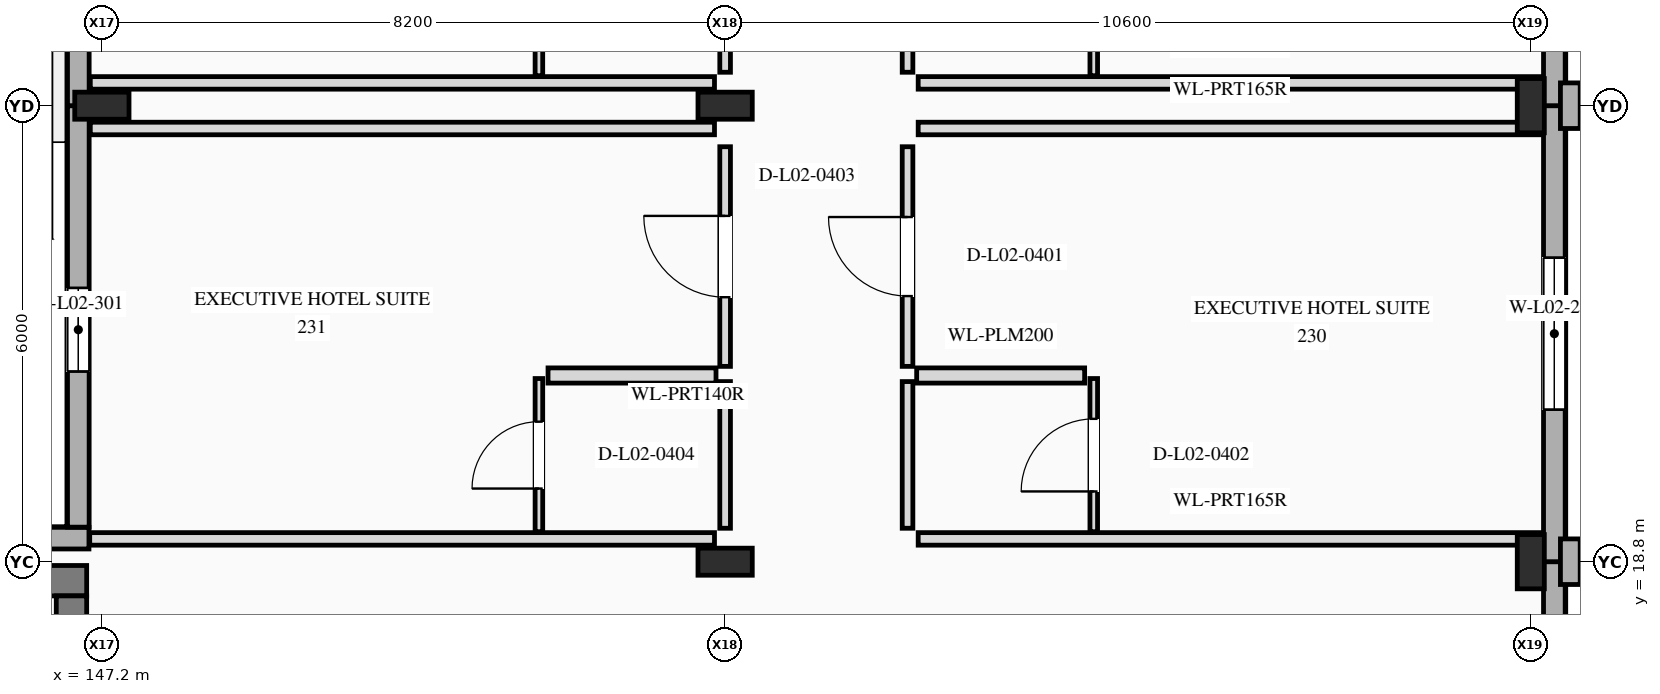
"""IFC4 building model, lengths in metres.
Left out: names, types, materials, properties, quantities, classifications, styles, units other than length and angle.
Written with IfcOpenShell. Run it as: python <this file> out.ifc"""

import sys

from ifc_helpers import new_model, si_unit, direction, frame, frame_2d, origin, origin_2d, place, context, subcontext, project, spatial, rectangle, i_section, extrude, element, fill, save


model = new_model("IFC4")
c1 = context("Model", 3, precision=1e-05, world=origin(), true_north=direction((0.0, 1.0)))
c2 = subcontext(c1, "Body", "Model", "MODEL_VIEW")
j1 = project(units=[si_unit("LENGTHUNIT", "METRE"), si_unit("PLANEANGLEUNIT", "RADIAN")], contexts=[c1])
p1 = place(None, origin())
s1 = spatial("IfcSite", under=j1, at=p1, CompositionType="ELEMENT")
p2 = place(p1, origin())
s2 = spatial("IfcBuilding", under=s1, at=p2, CompositionType="ELEMENT")
p3 = place(p2, frame((0.0, 0.0, 10.8)))
s3 = spatial("IfcBuildingStorey", under=s2, at=p3, CompositionType="ELEMENT", Elevation=10.8)
for number, where, z_axis, x_axis in (
    (1, (147.2, 24.8, 0.0), (0.0, 0.0, 1.0), (0.0, 1.0, 0.0)),
    (2, (155.4, 18.8, 0.0), (0.0, 0.0, 1.0), (0.0, 1.0, 0.0)),
    (3, (155.4, 24.8, 0.0), (0.0, 0.0, 1.0), (0.0, 1.0, 0.0)),
    (4, (166.0, 18.8, 0.0), (0.0, 0.0, 1.0), (1.0, 0.0, 0.0)),
    (5, (166.0, 24.8, 0.0), (0.0, 0.0, 1.0), (1.0, 0.0, 0.0)),
):
    element("IfcColumn", number, at=place(p3, frame(where, z_axis=z_axis, x_axis=x_axis)), inside=s3, PredefinedType="COLUMN", context=c2, shape_type="SweptSolid", body=[
        extrude(i_section(OverallWidth=0.356, OverallDepth=0.714, WebThickness=0.019, FlangeThickness=0.034, at=origin_2d()), origin(), (0.0, 0.0, 1.0), 4.8),
    ])
p4 = place(p3, frame((166.31, 8.2, 0.0), z_axis=(0.0, 0.0, 1.0), x_axis=(0.0, 1.0, 0.0)))
e6 = element("IfcWall", 6, at=p4, inside=s3, PredefinedType="STANDARD", context=c2, shape_type="SweptSolid", body=[
    extrude(rectangle(XDim=10.6, YDim=0.285, at=frame_2d((5.3, 0.0))), origin(), (0.0, 0.0, 1.0), 4.8),
])
p5 = place(p4, frame((4.55, 0.0, 0.88)))
e7 = element("IfcOpeningElement", 7, at=p5, cuts=e6, PredefinedType="OPENING", context=c2, shape_type="SweptSolid", body=[
    extrude(rectangle(XDim=1.5, YDim=1.7, at=frame_2d((0.75, 0.85))), frame((0.0, 0.152, 0.0), z_axis=(0.0, -1.0, 0.0), x_axis=(1.0, 0.0, 0.0)), (0.0, 0.0, 1.0), 0.305),
])
p6 = place(p3, frame((166.31, 18.8, 0.0), z_axis=(0.0, 0.0, 1.0), x_axis=(0.0, 1.0, 0.0)))
e8 = element("IfcWall", 8, at=p6, inside=s3, PredefinedType="STANDARD", context=c2, shape_type="SweptSolid", body=[
    extrude(rectangle(XDim=6.0, YDim=0.285, at=frame_2d((3.0, 0.0))), origin(), (0.0, 0.0, 1.0), 4.8),
])
p7 = place(p6, frame((2.0, 0.0, 0.85)))
e9 = element("IfcOpeningElement", 9, at=p7, cuts=e8, PredefinedType="OPENING", context=c2, shape_type="SweptSolid", body=[
    extrude(rectangle(XDim=2.0, YDim=1.65, at=frame_2d((1.0, 0.825))), frame((0.0, 0.152, 0.0), z_axis=(0.0, -1.0, 0.0), x_axis=(1.0, 0.0, 0.0)), (0.0, 0.0, 1.0), 0.305),
])
p8 = place(p3, frame((166.52, 18.5, 0.0), z_axis=(0.0, 0.0, 1.0), x_axis=(0.0, 1.0, 0.0)))
e10 = element("IfcWall", 10, at=p8, inside=s3, PredefinedType="ELEMENTEDWALL", context=c2, shape_type="SweptSolid", body=[
    extrude(rectangle(XDim=0.6, YDim=0.26, at=frame_2d((0.3, 0.0))), origin(), (0.0, 0.0, 1.0), 4.8),
])
p9 = place(p3, frame((166.31, 24.8, 0.0), z_axis=(0.0, 0.0, 1.0), x_axis=(0.0, 1.0, 0.0)))
e11 = element("IfcWall", 11, at=p9, inside=s3, PredefinedType="STANDARD", context=c2, shape_type="SweptSolid", body=[
    extrude(rectangle(XDim=8.4, YDim=0.285, at=frame_2d((4.2, 0.0))), origin(), (0.0, 0.0, 1.0), 4.8),
])
p10 = place(p9, frame((3.2, 0.0, 0.85)))
e12 = element("IfcOpeningElement", 12, at=p10, cuts=e11, PredefinedType="OPENING", context=c2, shape_type="SweptSolid", body=[
    extrude(rectangle(XDim=2.0, YDim=1.65, at=frame_2d((1.0, 0.825))), frame((0.0, 0.152, 0.0), z_axis=(0.0, -1.0, 0.0), x_axis=(1.0, 0.0, 0.0)), (0.0, 0.0, 1.0), 0.305),
])
p11 = place(p3, frame((166.52, 24.5, 0.0), z_axis=(0.0, 0.0, 1.0), x_axis=(0.0, 1.0, 0.0)))
e13 = element("IfcWall", 13, at=p11, inside=s3, PredefinedType="ELEMENTEDWALL", context=c2, shape_type="SweptSolid", body=[
    extrude(rectangle(XDim=0.6, YDim=0.26, at=frame_2d((0.3, 0.0))), origin(), (0.0, 0.0, 1.0), 4.8),
])
p12 = place(p3, frame((147.03, 19.11, 0.0), z_axis=(0.0, 0.0, 1.0), x_axis=(-1.0, 0.0, 0.0)))
e14 = element("IfcWall", 14, at=p12, inside=s3, PredefinedType="STANDARD", context=c2, shape_type="SweptSolid", body=[
    extrude(rectangle(XDim=11.03, YDim=0.285, at=frame_2d((5.515, 0.0))), origin(), (0.0, 0.0, 1.0), 4.8),
])
p13 = place(p3, frame((146.89, 19.254, 0.0), z_axis=(0.0, 0.0, 1.0), x_axis=(0.0, 1.0, 0.0)))
e15 = element("IfcWall", 15, at=p13, inside=s3, PredefinedType="STANDARD", context=c2, shape_type="SweptSolid", body=[
    extrude(rectangle(XDim=5.546, YDim=0.285, at=frame_2d((2.773, 0.0))), origin(), (0.0, 0.0, 1.0), 4.8),
])
p14 = place(p13, frame((2.048, 0.0, 0.85)))
e16 = element("IfcOpeningElement", 16, at=p14, cuts=e15, PredefinedType="OPENING", context=c2, shape_type="SweptSolid", body=[
    extrude(rectangle(XDim=1.1, YDim=1.5, at=frame_2d((0.55, 0.75))), frame((0.0, 0.152, 0.0), z_axis=(0.0, -1.0, 0.0), x_axis=(1.0, 0.0, 0.0)), (0.0, 0.0, 1.0), 0.305),
])
p15 = place(p3, frame((146.89, 24.8, 0.0), z_axis=(0.0, 0.0, 1.0), x_axis=(0.0, 1.0, 0.0)))
e17 = element("IfcWall", 17, at=p15, inside=s3, PredefinedType="STANDARD", context=c2, shape_type="SweptSolid", body=[
    extrude(rectangle(XDim=8.4, YDim=0.285, at=frame_2d((4.2, 0.0))), origin(), (0.0, 0.0, 1.0), 4.8),
])
p16 = place(p15, frame((3.3, 0.0, 0.85)))
e18 = element("IfcOpeningElement", 18, at=p16, cuts=e17, PredefinedType="OPENING", context=c2, shape_type="SweptSolid", body=[
    extrude(rectangle(XDim=1.8, YDim=1.8, at=frame_2d((0.9, 0.9))), frame((0.0, 0.152, 0.0), z_axis=(0.0, -1.0, 0.0), x_axis=(1.0, 0.0, 0.0)), (0.0, 0.0, 1.0), 0.305),
])
p17 = place(p3, frame((147.0, 18.55, 0.0), z_axis=(0.0, 0.0, 1.0), x_axis=(-1.0, 0.0, 0.0)))
e19 = element("IfcWall", 19, at=p17, inside=s3, PredefinedType="SHEAR", context=c2, shape_type="SweptSolid", body=[
    extrude(rectangle(XDim=10.6, YDim=0.4, at=frame_2d((5.3, 0.0))), origin(), (0.0, 0.0, 1.0), 4.8),
])
p18 = place(p3, frame((146.8, 11.0, 0.0), z_axis=(0.0, 0.0, 1.0), x_axis=(0.0, 1.0, 0.0)))
e20 = element("IfcWall", 20, at=p18, inside=s3, PredefinedType="SHEAR", context=c2, shape_type="SweptSolid", body=[
    extrude(rectangle(XDim=7.35, YDim=0.4, at=frame_2d((3.675, 0.0))), origin(), (0.0, 0.0, 1.0), 4.8),
])
p19 = place(p18, frame((5.0, 0.0, 0.0)))
e21 = element("IfcOpeningElement", 21, at=p19, cuts=e20, PredefinedType="OPENING", context=c2, shape_type="SweptSolid", body=[
    extrude(rectangle(XDim=0.95, YDim=2.2, at=frame_2d((0.475, 1.1))), frame((0.0, 0.21, 0.0), z_axis=(0.0, -1.0, 0.0), x_axis=(1.0, 0.0, 0.0)), (0.0, 0.0, 1.0), 0.42),
])
p20 = place(p18, frame((0.175, 0.0, 0.0)))
e22 = element("IfcOpeningElement", 22, at=p20, cuts=e20, PredefinedType="OPENING", context=c2, shape_type="SweptSolid", body=[
    extrude(rectangle(XDim=1.15, YDim=2.25, at=frame_2d((0.575, 1.125))), frame((0.0, 0.21, 0.0), z_axis=(0.0, -1.0, 0.0), x_axis=(1.0, 0.0, 0.0)), (0.0, 0.0, 1.0), 0.42),
])
p21 = place(p18, frame((1.875, 0.0, 0.0)))
e23 = element("IfcOpeningElement", 23, at=p21, cuts=e20, PredefinedType="OPENING", context=c2, shape_type="SweptSolid", body=[
    extrude(rectangle(XDim=1.15, YDim=2.25, at=frame_2d((0.575, 1.125))), frame((0.0, 0.21, 0.0), z_axis=(0.0, -1.0, 0.0), x_axis=(1.0, 0.0, 0.0)), (0.0, 0.0, 1.0), 0.42),
])
p22 = place(p3, frame((157.8, 19.24, 0.0), z_axis=(0.0, 0.0, 1.0), x_axis=(0.0, 1.0, 0.0)))
e24 = element("IfcWall", 24, at=p22, inside=s3, PredefinedType="PARTITIONING", context=c2, shape_type="SweptSolid", body=[
    extrude(rectangle(XDim=1.93, YDim=0.14, at=frame_2d((0.965, 0.0))), origin(), (0.0, 0.0, 1.0), 4.033),
])
p23 = place(p3, frame((157.8, 21.37, 0.0), z_axis=(0.0, 0.0, 1.0), x_axis=(0.0, 1.0, 0.0)))
e25 = element("IfcWall", 25, at=p23, inside=s3, PredefinedType="PARTITIONING", context=c2, shape_type="SweptSolid", body=[
    extrude(rectangle(XDim=2.89, YDim=0.14, at=frame_2d((1.445, 0.0))), origin(), (0.0, 0.0, 1.0), 4.033),
])
p24 = place(p23, frame((0.925, 0.0, 0.0)))
e26 = element("IfcOpeningElement", 26, at=p24, cuts=e25, PredefinedType="OPENING", context=c2, shape_type="SweptSolid", body=[
    extrude(rectangle(XDim=1.04, YDim=2.4, at=frame_2d((0.52, 1.2))), frame((0.0, 0.08, 0.0), z_axis=(0.0, -1.0, 0.0), x_axis=(1.0, 0.0, 0.0)), (0.0, 0.0, 1.0), 0.16),
])
for number, where, z_axis, x_axis in (
    (27, (157.94, 19.1, 0.0), (0.0, 0.0, 1.0), (1.0, 0.0, 0.0)),
    (28, (157.94, 24.5, 0.0), (0.0, 0.0, 1.0), (1.0, 0.0, 0.0)),
):
    element("IfcWall", number, at=place(p3, frame(where, z_axis=z_axis, x_axis=x_axis)), inside=s3, PredefinedType="PARTITIONING", context=c2, shape_type="SweptSolid", body=[
        extrude(rectangle(XDim=8.213, YDim=0.165, at=frame_2d((4.106, 0.0))), origin(), (0.0, 0.0, 1.0), 3.865),
    ])
p25 = place(p3, frame((157.92, 21.25, 0.0), z_axis=(0.0, 0.0, 1.0), x_axis=(1.0, 0.0, 0.0)))
e29 = element("IfcWall", 29, at=p25, inside=s3, PredefinedType="PLUMBINGWALL", context=c2, shape_type="SweptSolid", body=[
    extrude(rectangle(XDim=2.21, YDim=0.2, at=frame_2d((1.105, 0.0))), origin(), (0.0, 0.0, 1.0), 4.475),
])
p26 = place(p3, frame((160.25, 19.195, 0.0), z_axis=(0.0, 0.0, 1.0), x_axis=(0.0, 1.0, 0.0)))
e30 = element("IfcWall", 30, at=p26, inside=s3, PredefinedType="PARTITIONING", context=c2, shape_type="SweptSolid", body=[
    extrude(rectangle(XDim=2.015, YDim=0.1, at=frame_2d((1.008, 0.0))), origin(), (0.0, 0.0, 1.0), 4.033),
])
p27 = place(p26, frame((0.53, 0.0, 0.0)))
e31 = element("IfcOpeningElement", 31, at=p27, cuts=e30, PredefinedType="OPENING", context=c2, shape_type="SweptSolid", body=[
    extrude(rectangle(XDim=0.955, YDim=2.22, at=frame_2d((0.478, 1.11))), frame((0.0, 0.06, 0.0), z_axis=(0.0, -1.0, 0.0), x_axis=(1.0, 0.0, 0.0)), (0.0, 0.0, 1.0), 0.12),
])
p28 = place(p3, frame((155.4, 19.24, 0.0), z_axis=(0.0, 0.0, 1.0), x_axis=(0.0, 1.0, 0.0)))
e32 = element("IfcWall", 32, at=p28, inside=s3, PredefinedType="PARTITIONING", context=c2, shape_type="SweptSolid", body=[
    extrude(rectangle(XDim=1.93, YDim=0.14, at=frame_2d((0.965, 0.0))), origin(), (0.0, 0.0, 1.0), 3.949),
])
p29 = place(p3, frame((155.4, 21.37, 0.0), z_axis=(0.0, 0.0, 1.0), x_axis=(0.0, 1.0, 0.0)))
e33 = element("IfcWall", 33, at=p29, inside=s3, PredefinedType="PARTITIONING", context=c2, shape_type="SweptSolid", body=[
    extrude(rectangle(XDim=2.89, YDim=0.14, at=frame_2d((1.445, 0.0))), origin(), (0.0, 0.0, 1.0), 3.949),
])
p30 = place(p29, frame((0.91, 0.0, 0.0)))
e34 = element("IfcOpeningElement", 34, at=p30, cuts=e33, PredefinedType="OPENING", context=c2, shape_type="SweptSolid", body=[
    extrude(rectangle(XDim=1.07, YDim=2.4, at=frame_2d((0.535, 1.2))), frame((0.0, 0.08, 0.0), z_axis=(0.0, -1.0, 0.0), x_axis=(1.0, 0.0, 0.0)), (0.0, 0.0, 1.0), 0.16),
])
p31 = place(p3, frame((147.04, 19.1, 0.0), z_axis=(0.0, 0.0, 1.0), x_axis=(1.0, 0.0, 0.0)))
e35 = element("IfcWall", 35, at=p31, inside=s3, PredefinedType="PARTITIONING", context=c2, shape_type="SweptSolid", body=[
    extrude(rectangle(XDim=8.22, YDim=0.165, at=frame_2d((4.11, 0.0))), origin(), (0.0, 0.0, 1.0), 4.475),
])
p32 = place(p3, frame((147.048, 24.5, 0.0), z_axis=(0.0, 0.0, 1.0), x_axis=(1.0, 0.0, 0.0)))
e36 = element("IfcWall", 36, at=p32, inside=s3, PredefinedType="PARTITIONING", context=c2, shape_type="SweptSolid", body=[
    extrude(rectangle(XDim=8.212, YDim=0.165, at=frame_2d((4.106, 0.0))), origin(), (0.0, 0.0, 1.0), 3.888),
])
p33 = place(p3, frame((153.07, 21.25, 0.0), z_axis=(0.0, 0.0, 1.0), x_axis=(1.0, 0.0, 0.0)))
e37 = element("IfcWall", 37, at=p33, inside=s3, PredefinedType="PLUMBINGWALL", context=c2, shape_type="SweptSolid", body=[
    extrude(rectangle(XDim=2.21, YDim=0.2, at=frame_2d((1.105, 0.0))), origin(), (0.0, 0.0, 1.0), 4.475),
])
p34 = place(p3, frame((152.95, 19.195, 0.0), z_axis=(0.0, 0.0, 1.0), x_axis=(0.0, 1.0, 0.0)))
e38 = element("IfcWall", 38, at=p34, inside=s3, PredefinedType="PARTITIONING", context=c2, shape_type="SweptSolid", body=[
    extrude(rectangle(XDim=2.015, YDim=0.1, at=frame_2d((1.008, 0.0))), origin(), (0.0, 0.0, 1.0), 4.475),
])
p35 = place(p34, frame((0.568, 0.0, 0.0)))
e39 = element("IfcOpeningElement", 39, at=p35, cuts=e38, PredefinedType="OPENING", context=c2, shape_type="SweptSolid", body=[
    extrude(rectangle(XDim=0.88, YDim=2.1, at=frame_2d((0.44, 1.05))), frame((0.0, 0.06, 0.0), z_axis=(0.0, -1.0, 0.0), x_axis=(1.0, 0.0, 0.0)), (0.0, 0.0, 1.0), 0.12),
])
p36 = place(p3, frame((157.8, 25.24, 0.0), z_axis=(0.0, 0.0, 1.0), x_axis=(0.0, 1.0, 0.0)))
e40 = element("IfcWall", 40, at=p36, inside=s3, PredefinedType="PARTITIONING", context=c2, shape_type="SweptSolid", body=[
    extrude(rectangle(XDim=1.93, YDim=0.14, at=frame_2d((0.965, 0.0))), origin(), (0.0, 0.0, 1.0), 4.028),
])
p37 = place(p3, frame((157.94, 25.1, 0.0), z_axis=(0.0, 0.0, 1.0), x_axis=(1.0, 0.0, 0.0)))
e41 = element("IfcWall", 41, at=p37, inside=s3, PredefinedType="PARTITIONING", context=c2, shape_type="SweptSolid", body=[
    extrude(rectangle(XDim=8.213, YDim=0.165, at=frame_2d((4.106, 0.0))), origin(), (0.0, 0.0, 1.0), 3.865),
])
p38 = place(p3, frame((160.25, 25.195, 0.0), z_axis=(0.0, 0.0, 1.0), x_axis=(0.0, 1.0, 0.0)))
e42 = element("IfcWall", 42, at=p38, inside=s3, PredefinedType="PARTITIONING", context=c2, shape_type="SweptSolid", body=[
    extrude(rectangle(XDim=2.015, YDim=0.1, at=frame_2d((1.008, 0.0))), origin(), (0.0, 0.0, 1.0), 4.028),
])
p39 = place(p38, frame((0.555, 0.0, 0.0)))
e43 = element("IfcOpeningElement", 43, at=p39, cuts=e42, PredefinedType="OPENING", context=c2, shape_type="SweptSolid", body=[
    extrude(rectangle(XDim=0.905, YDim=2.1, at=frame_2d((0.453, 1.05))), frame((0.0, 0.06, 0.0), z_axis=(0.0, -1.0, 0.0), x_axis=(1.0, 0.0, 0.0)), (0.0, 0.0, 1.0), 0.12),
])
p40 = place(p3, frame((155.4, 25.24, 0.0), z_axis=(0.0, 0.0, 1.0), x_axis=(0.0, 1.0, 0.0)))
e44 = element("IfcWall", 44, at=p40, inside=s3, PredefinedType="PARTITIONING", context=c2, shape_type="SweptSolid", body=[
    extrude(rectangle(XDim=1.93, YDim=0.14, at=frame_2d((0.965, 0.0))), origin(), (0.0, 0.0, 1.0), 3.949),
])
p41 = place(p3, frame((147.048, 25.1, 0.0), z_axis=(0.0, 0.0, 1.0), x_axis=(1.0, 0.0, 0.0)))
e45 = element("IfcWall", 45, at=p41, inside=s3, PredefinedType="PARTITIONING", context=c2, shape_type="SweptSolid", body=[
    extrude(rectangle(XDim=8.212, YDim=0.165, at=frame_2d((4.106, 0.0))), origin(), (0.0, 0.0, 1.0), 3.888),
])
p42 = place(p3, frame((152.95, 25.195, 0.0), z_axis=(0.0, 0.0, 1.0), x_axis=(0.0, 1.0, 0.0)))
e46 = element("IfcWall", 46, at=p42, inside=s3, PredefinedType="PARTITIONING", context=c2, shape_type="SweptSolid", body=[
    extrude(rectangle(XDim=2.015, YDim=0.1, at=frame_2d((1.008, 0.0))), origin(), (0.0, 0.0, 1.0), 4.083),
])
p43 = place(p42, frame((0.543, 0.0, 0.0)))
e47 = element("IfcOpeningElement", 47, at=p43, cuts=e46, PredefinedType="OPENING", context=c2, shape_type="SweptSolid", body=[
    extrude(rectangle(XDim=0.93, YDim=2.14, at=frame_2d((0.465, 1.07))), frame((0.0, 0.06, 0.0), z_axis=(0.0, -1.0, 0.0), x_axis=(1.0, 0.0, 0.0)), (0.0, 0.0, 1.0), 0.12),
])
p44 = place(p7, origin())
e48 = element("IfcWindow", 48, at=p44, inside=s3, PartitioningType="SINGLE_PANEL", PredefinedType="WINDOW", context=c2, shape_type="SweptSolid", body=[
    extrude(rectangle(XDim=2.0, YDim=1.65, at=frame_2d((1.0, 0.825))), frame((0.0, 0.03, 0.0), z_axis=(0.0, -1.0, 0.0), x_axis=(1.0, 0.0, 0.0)), (0.0, 0.0, 1.0), 0.06),
])
fill(e9, e48)
p45 = place(p14, origin())
e49 = element("IfcWindow", 49, at=p45, inside=s3, PartitioningType="SINGLE_PANEL", PredefinedType="WINDOW", context=c2, shape_type="SweptSolid", body=[
    extrude(rectangle(XDim=1.1, YDim=1.5, at=frame_2d((0.55, 0.75))), frame((0.0, 0.03, 0.0), z_axis=(0.0, -1.0, 0.0), x_axis=(1.0, 0.0, 0.0)), (0.0, 0.0, 1.0), 0.06),
])
fill(e16, e49)
p46 = place(p24, origin())
e50 = element("IfcDoor", 50, at=p46, inside=s3, OperationType="SINGLE_SWING_RIGHT", PredefinedType="DOOR", context=c2, shape_type="SweptSolid", body=[
    extrude(rectangle(XDim=1.04, YDim=2.4, at=frame_2d((0.52, 1.2))), frame((0.0, 0.025, 0.0), z_axis=(0.0, -1.0, 0.0), x_axis=(1.0, 0.0, 0.0)), (0.0, 0.0, 1.0), 0.05),
])
fill(e26, e50)
p47 = place(p27, origin())
e51 = element("IfcDoor", 51, at=p47, inside=s3, OperationType="SINGLE_SWING_LEFT", PredefinedType="DOOR", context=c2, shape_type="SweptSolid", body=[
    extrude(rectangle(XDim=0.955, YDim=2.22, at=frame_2d((0.478, 1.11))), frame((0.0, 0.025, 0.0), z_axis=(0.0, -1.0, 0.0), x_axis=(1.0, 0.0, 0.0)), (0.0, 0.0, 1.0), 0.05),
])
fill(e31, e51)
p48 = place(p30, origin())
e52 = element("IfcDoor", 52, at=p48, inside=s3, OperationType="SINGLE_SWING_RIGHT", PredefinedType="DOOR", context=c2, shape_type="SweptSolid", body=[
    extrude(rectangle(XDim=1.07, YDim=2.4, at=frame_2d((0.535, 1.2))), frame((0.0, 0.025, 0.0), z_axis=(0.0, -1.0, 0.0), x_axis=(1.0, 0.0, 0.0)), (0.0, 0.0, 1.0), 0.05),
])
fill(e34, e52)
p49 = place(p35, origin())
e53 = element("IfcDoor", 53, at=p49, inside=s3, OperationType="SINGLE_SWING_LEFT", PredefinedType="DOOR", context=c2, shape_type="SweptSolid", body=[
    extrude(rectangle(XDim=0.88, YDim=2.1, at=frame_2d((0.44, 1.05))), frame((0.0, 0.025, 0.0), z_axis=(0.0, -1.0, 0.0), x_axis=(1.0, 0.0, 0.0)), (0.0, 0.0, 1.0), 0.05),
])
fill(e39, e53)
save(model, sys.argv[1])
